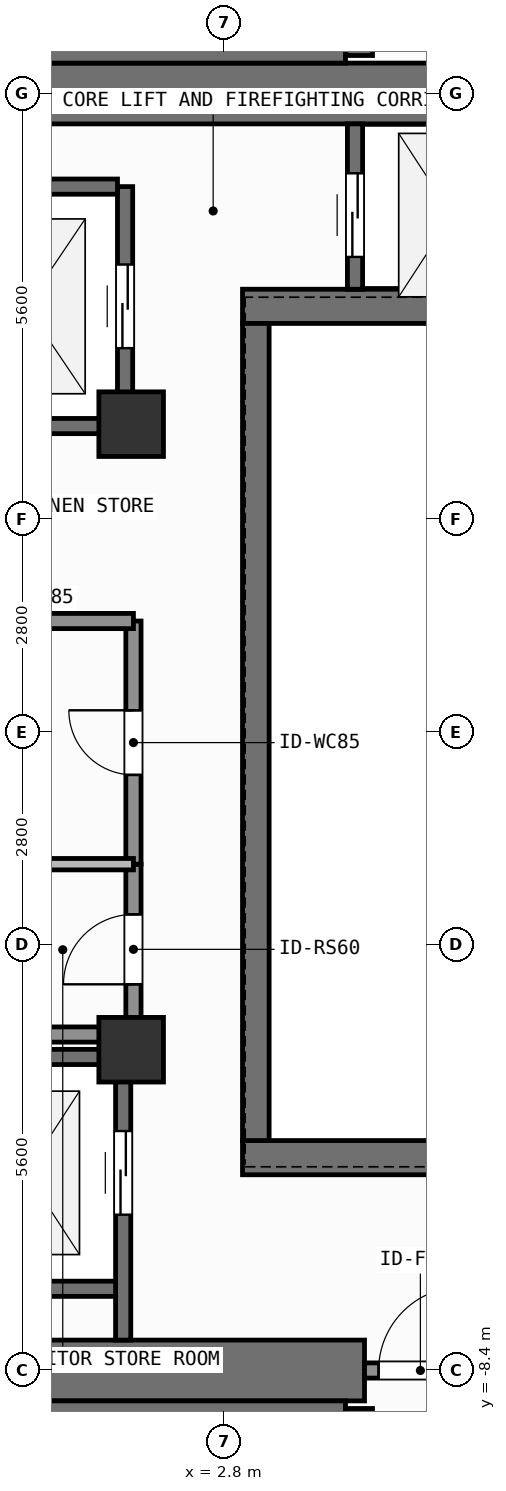
"""IFC4 building model, lengths in metres.
Left out: names, types, materials, properties, quantities, classifications, styles, units other than length and angle.
Written with IfcOpenShell. Run it as: python <this file> out.ifc"""

import sys

from ifc_helpers import new_model, si_unit, direction, frame, frame_2d, origin, origin_2d, place, context, subcontext, project, spatial, rectangle, extrude, element, fill, save


model = new_model("IFC4")
c1 = context("Model", 3, precision=1e-05, world=origin(), true_north=direction((0.0, 1.0)))
c2 = subcontext(c1, "Body", "Model", "MODEL_VIEW")
j1 = project(units=[si_unit("LENGTHUNIT", "METRE"), si_unit("PLANEANGLEUNIT", "RADIAN")], contexts=[c1])
p1 = place(None, origin())
s1 = spatial("IfcSite", under=j1, at=p1, CompositionType="ELEMENT")
p2 = place(p1, origin())
s2 = spatial("IfcBuilding", under=s1, at=p2, CompositionType="ELEMENT")
p3 = place(p2, frame((0.0, 0.0, 168.0)))
s3 = spatial("IfcBuildingStorey", under=s2, at=p3, CompositionType="ELEMENT", Elevation=168.0)
p4 = place(p3, frame((-2.62, -8.4, 0.0), z_axis=(0.0, 0.0, 1.0), x_axis=(1.0, 0.0, 0.0)))
e1 = element("IfcWall", 1, at=p4, inside=s3, PredefinedType="SHEAR", context=c2, shape_type="SweptSolid", body=[
    extrude(rectangle(XDim=7.27, YDim=0.8, at=frame_2d((3.635, 0.0))), origin(), (0.0, 0.0, 1.0), 3.9),
])
p5 = place(p3, frame((-7.55, 8.4, 0.0), z_axis=(0.0, 0.0, 1.0), x_axis=(1.0, 0.0, 0.0)))
e2 = element("IfcWall", 2, at=p5, inside=s3, PredefinedType="SHEAR", context=c2, shape_type="SweptSolid", body=[
    extrude(rectangle(XDim=16.35, YDim=0.8, at=frame_2d((8.175, 0.0))), origin(), (0.0, 0.0, 1.0), 3.9),
])
for number, where, z_axis, x_axis in (
    (3, (3.045, -5.6, 0.0), (0.0, 0.0, 1.0), (1.0, 0.0, 0.0)),
    (4, (3.045, 5.6, 0.0), (0.0, 0.0, 1.0), (1.0, 0.0, 0.0)),
):
    element("IfcWall", number, at=place(p3, frame(where, z_axis=z_axis, x_axis=x_axis)), inside=s3, PredefinedType="SHEAR", context=c2, shape_type="SweptSolid", body=[
        extrude(rectangle(XDim=5.755, YDim=0.45, at=frame_2d((2.877, 0.0))), origin(), (0.0, 0.0, 1.0), 3.9),
    ])
p6 = place(p3, frame((3.22, -5.375, 0.0), z_axis=(0.0, 0.0, 1.0), x_axis=(0.0, 1.0, 0.0)))
e5 = element("IfcWall", 5, at=p6, inside=s3, PredefinedType="SHEAR", context=c2, shape_type="SweptSolid", body=[
    extrude(rectangle(XDim=10.75, YDim=0.35, at=frame_2d((5.375, 0.0))), origin(), (0.0, 0.0, 1.0), 3.9),
])
p7 = place(p3, frame((-2.2, -8.913, 0.0), z_axis=(0.0, 0.0, 1.0), x_axis=(1.0, 0.0, 0.0)))
e6 = element("IfcWall", 6, at=p7, inside=s3, PredefinedType="SHEAR", context=c2, shape_type="SweptSolid", body=[
    extrude(rectangle(XDim=6.6, YDim=0.225, at=frame_2d((3.3, 0.0))), origin(), (0.0, 0.0, 1.0), 3.9),
])
p8 = place(p3, frame((4.58, -8.9, 0.0), z_axis=(0.0, 0.0, 1.0), x_axis=(0.0, -1.0, 0.0)))
e7 = element("IfcWall", 7, at=p8, inside=s3, PredefinedType="SHEAR", context=c2, shape_type="SweptSolid", body=[
    extrude(rectangle(XDim=2.925, YDim=0.35, at=frame_2d((1.462, 0.0))), origin(), (0.0, 0.0, 1.0), 3.9),
])
p9 = place(p8, frame((0.913, 0.0, 0.0)))
e8 = element("IfcOpeningElement", 8, at=p9, cuts=e7, PredefinedType="OPENING", context=c2, shape_type="SweptSolid", body=[
    extrude(rectangle(XDim=1.1, YDim=2.15, at=frame_2d((0.55, 1.075))), frame((0.0, 0.185, 0.0), z_axis=(0.0, -1.0, 0.0), x_axis=(1.0, 0.0, 0.0)), (0.0, 0.0, 1.0), 0.37),
])
p10 = place(p3, frame((-2.2, 8.913, 0.0), z_axis=(0.0, 0.0, 1.0), x_axis=(1.0, 0.0, 0.0)))
e9 = element("IfcWall", 9, at=p10, inside=s3, PredefinedType="SHEAR", context=c2, shape_type="SweptSolid", body=[
    extrude(rectangle(XDim=6.6, YDim=0.225, at=frame_2d((3.3, 0.0))), origin(), (0.0, 0.0, 1.0), 3.9),
])
p11 = place(p3, frame((4.58, 11.825, 0.0), z_axis=(0.0, 0.0, 1.0), x_axis=(0.0, -1.0, 0.0)))
e10 = element("IfcWall", 10, at=p11, inside=s3, PredefinedType="SHEAR", context=c2, shape_type="SweptSolid", body=[
    extrude(rectangle(XDim=2.925, YDim=0.35, at=frame_2d((1.462, 0.0))), origin(), (0.0, 0.0, 1.0), 3.9),
])
p12 = place(p11, frame((0.913, 0.0, 0.0)))
e11 = element("IfcOpeningElement", 11, at=p12, cuts=e10, PredefinedType="OPENING", context=c2, shape_type="SweptSolid", body=[
    extrude(rectangle(XDim=1.1, YDim=2.15, at=frame_2d((0.55, 1.075))), frame((0.0, 0.185, 0.0), z_axis=(0.0, -1.0, 0.0), x_axis=(1.0, 0.0, 0.0)), (0.0, 0.0, 1.0), 0.37),
])
for number, where, z_axis, x_axis in (
    (12, (1.58, -4.18, 0.0), (0.0, 0.0, 1.0), (1.0, 0.0, 0.0)),
    (13, (1.58, 4.05, 0.0), (0.0, 0.0, 1.0), (1.0, 0.0, 0.0)),
):
    element("IfcColumn", number, at=place(p3, frame(where, z_axis=z_axis, x_axis=x_axis)), inside=s3, PredefinedType="COLUMN", context=c2, shape_type="SweptSolid", body=[
        extrude(rectangle(XDim=0.85, YDim=0.85, at=origin_2d()), origin(), (0.0, 0.0, 1.0), 3.9),
    ])
p13 = place(p3, frame((1.5, 4.025, 0.0), z_axis=(0.0, 0.0, 1.0), x_axis=(0.0, 1.0, 0.0)))
e14 = element("IfcWall", 14, at=p13, inside=s3, PredefinedType="SHEAR", context=c2, shape_type="SweptSolid", body=[
    extrude(rectangle(XDim=3.15, YDim=0.2, at=frame_2d((1.575, 0.0))), origin(), (0.0, 0.0, 1.0), 3.68),
])
p14 = place(p13, frame((1.025, 0.0, 0.0)))
e15 = element("IfcOpeningElement", 15, at=p14, cuts=e14, PredefinedType="OPENING", context=c2, shape_type="SweptSolid", body=[
    extrude(rectangle(XDim=1.1, YDim=2.2, at=frame_2d((0.55, 1.1))), frame((0.0, 0.11, 0.0), z_axis=(0.0, -1.0, 0.0), x_axis=(1.0, 0.0, 0.0)), (0.0, 0.0, 1.0), 0.22),
])
for number, where, z_axis, x_axis in (
    (16, (-1.0, 4.025, 0.0), (0.0, 0.0, 1.0), (1.0, 0.0, 0.0)),
    (17, (-1.0, 7.175, 0.0), (0.0, 0.0, 1.0), (1.0, 0.0, 0.0)),
):
    element("IfcWall", number, at=place(p3, frame(where, z_axis=z_axis, x_axis=x_axis)), inside=s3, PredefinedType="SHEAR", context=c2, shape_type="SweptSolid", body=[
        extrude(rectangle(XDim=2.4, YDim=0.2, at=frame_2d((1.2, 0.0))), origin(), (0.0, 0.0, 1.0), 3.68),
    ])
p15 = place(p3, frame((1.475, -8.0, 0.0), z_axis=(0.0, 0.0, 1.0), x_axis=(0.0, 1.0, 0.0)))
e18 = element("IfcWall", 18, at=p15, inside=s3, PredefinedType="SHEAR", context=c2, shape_type="SweptSolid", body=[
    extrude(rectangle(XDim=3.725, YDim=0.2, at=frame_2d((1.863, 0.0))), origin(), (0.0, 0.0, 1.0), 3.68),
])
p16 = place(p15, frame((1.65, 0.0, 0.0)))
e19 = element("IfcOpeningElement", 19, at=p16, cuts=e18, PredefinedType="OPENING", context=c2, shape_type="SweptSolid", body=[
    extrude(rectangle(XDim=1.1, YDim=2.2, at=frame_2d((0.55, 1.1))), frame((0.0, 0.11, 0.0), z_axis=(0.0, -1.0, 0.0), x_axis=(1.0, 0.0, 0.0)), (0.0, 0.0, 1.0), 0.22),
])
for number, where, z_axis, x_axis in (
    (20, (-0.975, -7.325, 0.0), (0.0, 0.0, 1.0), (1.0, 0.0, 0.0)),
    (21, (-0.975, -4.275, 0.0), (0.0, 0.0, 1.0), (1.0, 0.0, 0.0)),
):
    element("IfcWall", number, at=place(p3, frame(where, z_axis=z_axis, x_axis=x_axis)), inside=s3, PredefinedType="SHEAR", context=c2, shape_type="SweptSolid", body=[
        extrude(rectangle(XDim=2.35, YDim=0.2, at=frame_2d((1.175, 0.0))), origin(), (0.0, 0.0, 1.0), 3.68),
    ])
p17 = place(p3, frame((4.525, 5.825, 0.0), z_axis=(0.0, 0.0, 1.0), x_axis=(0.0, 1.0, 0.0)))
e22 = element("IfcWall", 22, at=p17, inside=s3, PredefinedType="SHEAR", context=c2, shape_type="SweptSolid", body=[
    extrude(rectangle(XDim=2.175, YDim=0.2, at=frame_2d((1.087, 0.0))), origin(), (0.0, 0.0, 1.0), 3.68),
])
p18 = place(p17, frame((0.425, 0.0, 0.0)))
e23 = element("IfcOpeningElement", 23, at=p18, cuts=e22, PredefinedType="OPENING", context=c2, shape_type="SweptSolid", body=[
    extrude(rectangle(XDim=1.1, YDim=2.2, at=frame_2d((0.55, 1.1))), frame((0.0, 0.11, 0.0), z_axis=(0.0, -1.0, 0.0), x_axis=(1.0, 0.0, 0.0)), (0.0, 0.0, 1.0), 0.22),
])
p19 = place(p3, frame((4.65, -8.4, 0.0), z_axis=(0.0, 0.0, 1.0), x_axis=(1.0, 0.0, 0.0)))
e24 = element("IfcWall", 24, at=p19, inside=s3, PredefinedType="SOLIDWALL", context=c2, shape_type="SweptSolid", body=[
    extrude(rectangle(XDim=1.47, YDim=0.2, at=frame_2d((0.735, 0.0))), origin(), (0.0, 0.0, 1.0), 2.82),
])
p20 = place(p19, frame((0.185, 0.0, 0.0)))
e25 = element("IfcOpeningElement", 25, at=p20, cuts=e24, PredefinedType="OPENING", context=c2, shape_type="SweptSolid", body=[
    extrude(rectangle(XDim=1.1, YDim=2.15, at=frame_2d((0.55, 1.075))), frame((0.0, 0.11, 0.0), z_axis=(0.0, -1.0, 0.0), x_axis=(1.0, 0.0, 0.0)), (0.0, 0.0, 1.0), 0.22),
])
p21 = place(p3, frame((1.61, -3.98, 0.0), z_axis=(0.0, 0.0, 1.0), x_axis=(0.0, 1.0, 0.0)))
e26 = element("IfcWall", 26, at=p21, inside=s3, PredefinedType="SOLIDWALL", context=c2, shape_type="SweptSolid", body=[
    extrude(rectangle(XDim=2.241, YDim=0.2, at=frame_2d((1.121, 0.0))), origin(), (0.0, 0.0, 1.0), 3.68),
])
p22 = place(p21, frame((0.66, 0.0, 0.0)))
e27 = element("IfcOpeningElement", 27, at=p22, cuts=e26, PredefinedType="OPENING", context=c2, shape_type="SweptSolid", body=[
    extrude(rectangle(XDim=0.92, YDim=2.1, at=frame_2d((0.46, 1.05))), frame((0.0, 0.11, 0.0), z_axis=(0.0, -1.0, 0.0), x_axis=(1.0, 0.0, 0.0)), (0.0, 0.0, 1.0), 0.22),
])
p23 = place(p3, frame((1.61, -1.739, 0.0), z_axis=(0.0, 0.0, 1.0), x_axis=(0.0, 1.0, 0.0)))
e28 = element("IfcWall", 28, at=p23, inside=s3, PredefinedType="SOLIDWALL", context=c2, shape_type="SweptSolid", body=[
    extrude(rectangle(XDim=3.199, YDim=0.2, at=frame_2d((1.6, 0.0))), origin(), (0.0, 0.0, 1.0), 3.68),
])
p24 = place(p23, frame((1.175, 0.0, 0.0)))
e29 = element("IfcOpeningElement", 29, at=p24, cuts=e28, PredefinedType="OPENING", context=c2, shape_type="SweptSolid", body=[
    extrude(rectangle(XDim=0.85, YDim=2.1, at=frame_2d((0.425, 1.05))), frame((0.0, 0.11, 0.0), z_axis=(0.0, -1.0, 0.0), x_axis=(1.0, 0.0, 0.0)), (0.0, 0.0, 1.0), 0.22),
])
for number, where, z_axis, x_axis in (
    (30, (-1.58, -3.98, 0.0), (0.0, 0.0, 1.0), (1.0, 0.0, 0.0)),
    (31, (-1.58, 1.46, 0.0), (0.0, 0.0, 1.0), (1.0, 0.0, 0.0)),
):
    element("IfcWall", number, at=place(p3, frame(where, z_axis=z_axis, x_axis=x_axis)), inside=s3, PredefinedType="SOLIDWALL", context=c2, shape_type="SweptSolid", body=[
        extrude(rectangle(XDim=3.19, YDim=0.2, at=frame_2d((1.595, 0.0))), origin(), (0.0, 0.0, 1.0), 3.68),
    ])
p25 = place(p3, frame((-1.58, -1.739, 0.0), z_axis=(0.0, 0.0, 1.0), x_axis=(1.0, 0.0, 0.0)))
e32 = element("IfcWall", 32, at=p25, inside=s3, PredefinedType="PARTITIONING", context=c2, shape_type="SweptSolid", body=[
    extrude(rectangle(XDim=3.19, YDim=0.15, at=frame_2d((1.595, 0.0))), origin(), (0.0, 0.0, 1.0), 3.68),
])
p26 = place(p14, origin())
e33 = element("IfcDoor", 33, at=p26, inside=s3, OperationType="SLIDING_TO_LEFT", PredefinedType="DOOR", context=c2, shape_type="SweptSolid", body=[
    extrude(rectangle(XDim=1.1, YDim=2.2, at=frame_2d((0.55, 1.1))), frame((0.0, 0.025, 0.0), z_axis=(0.0, -1.0, 0.0), x_axis=(1.0, 0.0, 0.0)), (0.0, 0.0, 1.0), 0.05),
])
fill(e15, e33)
p27 = place(p16, origin())
e34 = element("IfcDoor", 34, at=p27, inside=s3, OperationType="SLIDING_TO_LEFT", PredefinedType="DOOR", context=c2, shape_type="SweptSolid", body=[
    extrude(rectangle(XDim=1.1, YDim=2.2, at=frame_2d((0.55, 1.1))), frame((0.0, 0.025, 0.0), z_axis=(0.0, -1.0, 0.0), x_axis=(1.0, 0.0, 0.0)), (0.0, 0.0, 1.0), 0.05),
])
fill(e19, e34)
p28 = place(p18, origin())
e35 = element("IfcDoor", 35, at=p28, inside=s3, OperationType="SLIDING_TO_LEFT", PredefinedType="DOOR", context=c2, shape_type="SweptSolid", body=[
    extrude(rectangle(XDim=1.1, YDim=2.2, at=frame_2d((0.55, 1.1))), frame((0.0, 0.025, 0.0), z_axis=(0.0, -1.0, 0.0), x_axis=(1.0, 0.0, 0.0)), (0.0, 0.0, 1.0), 0.05),
])
fill(e23, e35)
p29 = place(p20, origin())
e36 = element("IfcDoor", 36, at=p29, inside=s3, OperationType="SINGLE_SWING_RIGHT", PredefinedType="DOOR", context=c2, shape_type="SweptSolid", body=[
    extrude(rectangle(XDim=1.1, YDim=2.15, at=frame_2d((0.55, 1.075))), frame((0.0, 0.025, 0.0), z_axis=(0.0, -1.0, 0.0), x_axis=(1.0, 0.0, 0.0)), (0.0, 0.0, 1.0), 0.05),
])
fill(e25, e36)
p30 = place(p22, origin())
e37 = element("IfcDoor", 37, at=p30, inside=s3, OperationType="SINGLE_SWING_LEFT", PredefinedType="DOOR", context=c2, shape_type="SweptSolid", body=[
    extrude(rectangle(XDim=0.92, YDim=2.1, at=frame_2d((0.46, 1.05))), frame((0.0, 0.025, 0.0), z_axis=(0.0, -1.0, 0.0), x_axis=(1.0, 0.0, 0.0)), (0.0, 0.0, 1.0), 0.05),
])
fill(e27, e37)
p31 = place(p24, origin())
e38 = element("IfcDoor", 38, at=p31, inside=s3, OperationType="SINGLE_SWING_RIGHT", PredefinedType="DOOR", context=c2, shape_type="SweptSolid", body=[
    extrude(rectangle(XDim=0.85, YDim=2.1, at=frame_2d((0.425, 1.05))), frame((0.0, 0.025, 0.0), z_axis=(0.0, -1.0, 0.0), x_axis=(1.0, 0.0, 0.0)), (0.0, 0.0, 1.0), 0.05),
])
fill(e29, e38)
save(model, sys.argv[1])
